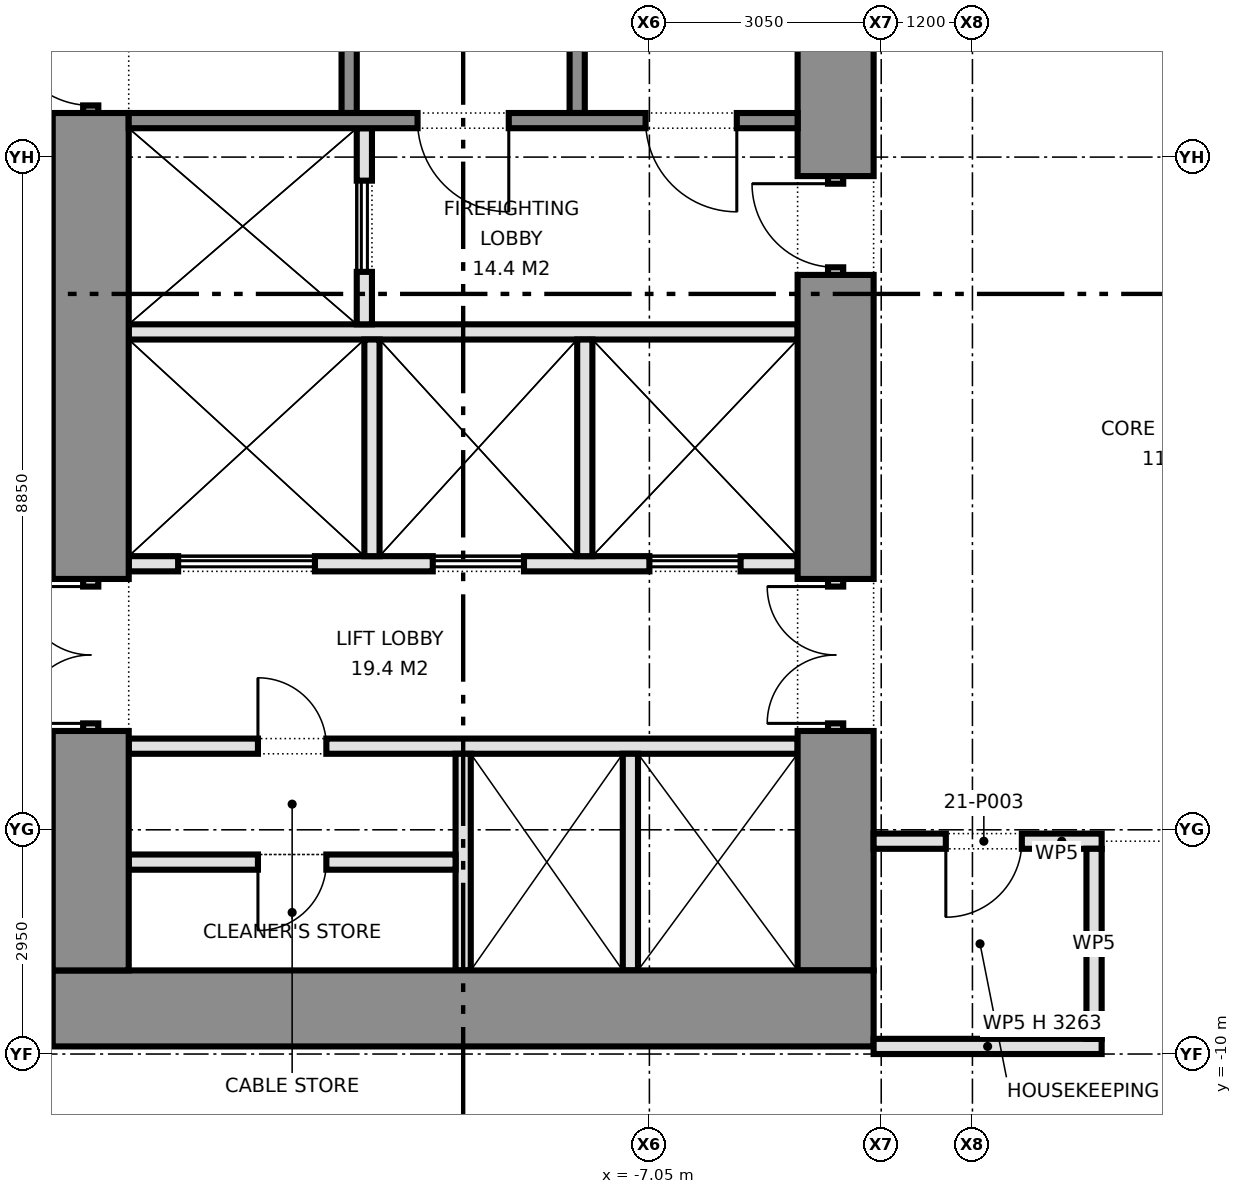
"""IFC4 building model, lengths in metres.
Left out: names, types, materials, properties, quantities, classifications, styles, units other than length and angle.
Written with IfcOpenShell. Run it as: python <this file> out.ifc"""

import sys

from ifc_helpers import new_model, si_unit, direction, frame, frame_2d, origin, place, context, subcontext, project, spatial, rectangle, extrude, element, fill, save


model = new_model("IFC4")
c1 = context("Model", 3, precision=1e-05, world=origin(), true_north=direction((0.0, 1.0)))
c2 = subcontext(c1, "Body", "Model", "MODEL_VIEW")
j1 = project(units=[si_unit("LENGTHUNIT", "METRE"), si_unit("PLANEANGLEUNIT", "RADIAN")], contexts=[c1])
p1 = place(None, origin())
s1 = spatial("IfcSite", under=j1, at=p1, CompositionType="ELEMENT")
p2 = place(p1, origin())
s2 = spatial("IfcBuilding", under=s1, at=p2, CompositionType="ELEMENT")
p3 = place(p2, frame((0.0, 0.0, 95.2)))
s3 = spatial("IfcBuildingStorey", under=s2, at=p3, CompositionType="ELEMENT", Elevation=95.2)
p4 = place(p3, frame((-14.9, -9.4, 0.0), z_axis=(0.0, 0.0, 1.0), x_axis=(1.0, 0.0, 0.0)))
e1 = element("IfcWall", 1, at=p4, inside=s3, PredefinedType="SHEAR", context=c2, shape_type="SweptSolid", body=[
    extrude(rectangle(XDim=10.8, YDim=1.0, at=frame_2d((5.4, 0.0))), origin(), (0.0, 0.0, 1.0), 4.2),
])
p5 = place(p3, frame((-14.4, -8.9, 0.0), z_axis=(0.0, 0.0, 1.0), x_axis=(0.0, 1.0, 0.0)))
e2 = element("IfcWall", 2, at=p5, inside=s3, PredefinedType="SHEAR", context=c2, shape_type="SweptSolid", body=[
    extrude(rectangle(XDim=3.15, YDim=1.0, at=frame_2d((1.575, 0.0))), origin(), (0.0, 0.0, 1.0), 4.2),
])
p6 = place(p3, frame((-14.4, -5.75, 0.0), z_axis=(0.0, 0.0, 1.0), x_axis=(0.0, 1.0, 0.0)))
e3 = element("IfcWall", 3, at=p6, inside=s3, PredefinedType="PARTITIONING", context=c2, shape_type="SweptSolid", body=[
    extrude(rectangle(XDim=2.0, YDim=0.2, at=frame_2d((1.0, 0.0))), origin(), (0.0, 0.0, 1.0), 2.4),
])
p7 = place(p6, frame((0.1, 0.0, 0.0)))
e4 = element("IfcOpeningElement", 4, at=p7, cuts=e3, PredefinedType="OPENING", context=c2, shape_type="SweptSolid", body=[
    extrude(rectangle(XDim=1.8, YDim=2.1, at=frame_2d((0.9, 1.05))), frame((0.0, 0.11, 0.0), z_axis=(0.0, -1.0, 0.0), x_axis=(1.0, 0.0, 0.0)), (0.0, 0.0, 1.0), 0.22),
])
p8 = place(p3, frame((-14.4, -3.75, 0.0), z_axis=(0.0, 0.0, 1.0), x_axis=(0.0, 1.0, 0.0)))
e5 = element("IfcWall", 5, at=p8, inside=s3, PredefinedType="SHEAR", context=c2, shape_type="SweptSolid", body=[
    extrude(rectangle(XDim=6.13, YDim=1.0, at=frame_2d((3.065, 0.0))), origin(), (0.0, 0.0, 1.0), 4.2),
])
p9 = place(p3, frame((-14.4, 2.38, 0.0), z_axis=(0.0, 0.0, 1.0), x_axis=(0.0, 1.0, 0.0)))
e6 = element("IfcWall", 6, at=p9, inside=s3, PredefinedType="SHEAR", context=c2, shape_type="SweptSolid", body=[
    extrude(rectangle(XDim=1.3, YDim=0.2, at=frame_2d((0.65, 0.0))), origin(), (0.0, 0.0, 1.0), 2.4),
])
p10 = place(p9, frame((0.1, 0.0, 0.0)))
e7 = element("IfcOpeningElement", 7, at=p10, cuts=e6, PredefinedType="OPENING", context=c2, shape_type="SweptSolid", body=[
    extrude(rectangle(XDim=1.1, YDim=2.1, at=frame_2d((0.55, 1.05))), frame((0.0, 0.11, 0.0), z_axis=(0.0, -1.0, 0.0), x_axis=(1.0, 0.0, 0.0)), (0.0, 0.0, 1.0), 0.22),
])
p11 = place(p3, frame((-4.6, -8.9, 0.0), z_axis=(0.0, 0.0, 1.0), x_axis=(0.0, 1.0, 0.0)))
e8 = element("IfcWall", 8, at=p11, inside=s3, PredefinedType="SHEAR", context=c2, shape_type="SweptSolid", body=[
    extrude(rectangle(XDim=3.15, YDim=1.0, at=frame_2d((1.575, 0.0))), origin(), (0.0, 0.0, 1.0), 4.2),
])
p12 = place(p3, frame((-4.6, -5.75, 0.0), z_axis=(0.0, 0.0, 1.0), x_axis=(0.0, 1.0, 0.0)))
e9 = element("IfcWall", 9, at=p12, inside=s3, PredefinedType="PARTITIONING", context=c2, shape_type="SweptSolid", body=[
    extrude(rectangle(XDim=2.0, YDim=0.2, at=frame_2d((1.0, 0.0))), origin(), (0.0, 0.0, 1.0), 2.4),
])
p13 = place(p12, frame((0.1, 0.0, 0.0)))
e10 = element("IfcOpeningElement", 10, at=p13, cuts=e9, PredefinedType="OPENING", context=c2, shape_type="SweptSolid", body=[
    extrude(rectangle(XDim=1.8, YDim=2.1, at=frame_2d((0.9, 1.05))), frame((0.0, 0.11, 0.0), z_axis=(0.0, -1.0, 0.0), x_axis=(1.0, 0.0, 0.0)), (0.0, 0.0, 1.0), 0.22),
])
p14 = place(p3, frame((-4.6, -3.75, 0.0), z_axis=(0.0, 0.0, 1.0), x_axis=(0.0, 1.0, 0.0)))
e11 = element("IfcWall", 11, at=p14, inside=s3, PredefinedType="SHEAR", context=c2, shape_type="SweptSolid", body=[
    extrude(rectangle(XDim=4.0, YDim=1.0, at=frame_2d((2.0, 0.0))), origin(), (0.0, 0.0, 1.0), 4.2),
])
p15 = place(p3, frame((-4.6, 0.25, 0.0), z_axis=(0.0, 0.0, 1.0), x_axis=(0.0, 1.0, 0.0)))
e12 = element("IfcWall", 12, at=p15, inside=s3, PredefinedType="PARTITIONING", context=c2, shape_type="SweptSolid", body=[
    extrude(rectangle(XDim=1.3, YDim=0.2, at=frame_2d((0.65, 0.0))), origin(), (0.0, 0.0, 1.0), 2.4),
])
p16 = place(p15, frame((0.1, 0.0, 0.0)))
e13 = element("IfcOpeningElement", 13, at=p16, cuts=e12, PredefinedType="OPENING", context=c2, shape_type="SweptSolid", body=[
    extrude(rectangle(XDim=1.1, YDim=2.1, at=frame_2d((0.55, 1.05))), frame((0.0, 0.11, 0.0), z_axis=(0.0, -1.0, 0.0), x_axis=(1.0, 0.0, 0.0)), (0.0, 0.0, 1.0), 0.22),
])
p17 = place(p3, frame((-4.6, 1.55, 0.0), z_axis=(0.0, 0.0, 1.0), x_axis=(0.0, 1.0, 0.0)))
e14 = element("IfcWall", 14, at=p17, inside=s3, PredefinedType="SHEAR", context=c2, shape_type="SweptSolid", body=[
    extrude(rectangle(XDim=7.35, YDim=1.0, at=frame_2d((3.675, 0.0))), origin(), (0.0, 0.0, 1.0), 4.2),
])
p18 = place(p3, frame((-13.9, -5.95, 0.0), z_axis=(0.0, 0.0, 1.0), x_axis=(1.0, 0.0, 0.0)))
e15 = element("IfcWall", 15, at=p18, inside=s3, PredefinedType="PARTITIONING", context=c2, shape_type="SweptSolid", body=[
    extrude(rectangle(XDim=8.8, YDim=0.2, at=frame_2d((4.4, 0.0))), origin(), (0.0, 0.0, 1.0), 4.2),
])
p19 = place(p18, frame((1.7, 0.0, 0.0)))
e16 = element("IfcOpeningElement", 16, at=p19, cuts=e15, PredefinedType="OPENING", context=c2, shape_type="SweptSolid", body=[
    extrude(rectangle(XDim=0.9, YDim=2.1, at=frame_2d((0.45, 1.05))), frame((0.0, 0.11, 0.0), z_axis=(0.0, -1.0, 0.0), x_axis=(1.0, 0.0, 0.0)), (0.0, 0.0, 1.0), 0.22),
])
p20 = place(p3, frame((-13.9, -3.55, 0.0), z_axis=(0.0, 0.0, 1.0), x_axis=(1.0, 0.0, 0.0)))
e17 = element("IfcWall", 17, at=p20, inside=s3, PredefinedType="PARTITIONING", context=c2, shape_type="SweptSolid", body=[
    extrude(rectangle(XDim=8.8, YDim=0.2, at=frame_2d((4.4, 0.0))), origin(), (0.0, 0.0, 1.0), 4.2),
])
p21 = place(p20, frame((0.65, 0.0, 0.0)))
e18 = element("IfcOpeningElement", 18, at=p21, cuts=e17, PredefinedType="OPENING", context=c2, shape_type="SweptSolid", body=[
    extrude(rectangle(XDim=1.8, YDim=2.1, at=frame_2d((0.9, 1.05))), frame((0.0, 0.11, 0.0), z_axis=(0.0, -1.0, 0.0), x_axis=(1.0, 0.0, 0.0)), (0.0, 0.0, 1.0), 0.22),
])
p22 = place(p20, frame((4.0, 0.0, 0.0)))
e19 = element("IfcOpeningElement", 19, at=p22, cuts=e17, PredefinedType="OPENING", context=c2, shape_type="SweptSolid", body=[
    extrude(rectangle(XDim=1.2, YDim=2.1, at=frame_2d((0.6, 1.05))), frame((0.0, 0.11, 0.0), z_axis=(0.0, -1.0, 0.0), x_axis=(1.0, 0.0, 0.0)), (0.0, 0.0, 1.0), 0.22),
])
p23 = place(p20, frame((6.85, 0.0, 0.0)))
e20 = element("IfcOpeningElement", 20, at=p23, cuts=e17, PredefinedType="OPENING", context=c2, shape_type="SweptSolid", body=[
    extrude(rectangle(XDim=1.2, YDim=2.1, at=frame_2d((0.6, 1.05))), frame((0.0, 0.11, 0.0), z_axis=(0.0, -1.0, 0.0), x_axis=(1.0, 0.0, 0.0)), (0.0, 0.0, 1.0), 0.22),
])
p24 = place(p3, frame((-13.9, -0.5, 0.0), z_axis=(0.0, 0.0, 1.0), x_axis=(1.0, 0.0, 0.0)))
e21 = element("IfcWall", 21, at=p24, inside=s3, PredefinedType="PARTITIONING", context=c2, shape_type="SweptSolid", body=[
    extrude(rectangle(XDim=8.8, YDim=0.2, at=frame_2d((4.4, 0.0))), origin(), (0.0, 0.0, 1.0), 4.2),
])
p25 = place(p3, frame((-10.8, -0.4, 0.0), z_axis=(0.0, 0.0, 1.0), x_axis=(0.0, 1.0, 0.0)))
e22 = element("IfcWall", 22, at=p25, inside=s3, PredefinedType="PARTITIONING", context=c2, shape_type="SweptSolid", body=[
    extrude(rectangle(XDim=2.58, YDim=0.2, at=frame_2d((1.29, 0.0))), origin(), (0.0, 0.0, 1.0), 4.2),
])
p26 = place(p25, frame((0.69, 0.0, 0.0)))
e23 = element("IfcOpeningElement", 23, at=p26, cuts=e22, PredefinedType="OPENING", context=c2, shape_type="SweptSolid", body=[
    extrude(rectangle(XDim=1.2, YDim=2.1, at=frame_2d((0.6, 1.05))), frame((0.0, 0.11, 0.0), z_axis=(0.0, -1.0, 0.0), x_axis=(1.0, 0.0, 0.0)), (0.0, 0.0, 1.0), 0.22),
])
p27 = place(p3, frame((-13.9, 2.28, 0.0), z_axis=(0.0, 0.0, 1.0), x_axis=(1.0, 0.0, 0.0)))
e24 = element("IfcWall", 24, at=p27, inside=s3, PredefinedType="SHEAR", context=c2, shape_type="SweptSolid", body=[
    extrude(rectangle(XDim=8.8, YDim=0.2, at=frame_2d((4.4, 0.0))), origin(), (0.0, 0.0, 1.0), 4.2),
])
p28 = place(p27, frame((3.8, 0.0, 0.0)))
e25 = element("IfcOpeningElement", 25, at=p28, cuts=e24, PredefinedType="OPENING", context=c2, shape_type="SweptSolid", body=[
    extrude(rectangle(XDim=1.2, YDim=2.1, at=frame_2d((0.6, 1.05))), frame((0.0, 0.11, 0.0), z_axis=(0.0, -1.0, 0.0), x_axis=(1.0, 0.0, 0.0)), (0.0, 0.0, 1.0), 0.22),
])
p29 = place(p27, frame((6.8, 0.0, 0.0)))
e26 = element("IfcOpeningElement", 26, at=p29, cuts=e24, PredefinedType="OPENING", context=c2, shape_type="SweptSolid", body=[
    extrude(rectangle(XDim=1.2, YDim=2.1, at=frame_2d((0.6, 1.05))), frame((0.0, 0.11, 0.0), z_axis=(0.0, -1.0, 0.0), x_axis=(1.0, 0.0, 0.0)), (0.0, 0.0, 1.0), 0.22),
])
for number, where, z_axis, x_axis in (
    (27, (-11.0, 2.38, 0.0), (0.0, 0.0, 1.0), (0.0, 1.0, 0.0)),
    (28, (-8.0, 2.38, 0.0), (0.0, 0.0, 1.0), (0.0, 1.0, 0.0)),
):
    element("IfcWall", number, at=place(p3, frame(where, z_axis=z_axis, x_axis=x_axis)), inside=s3, PredefinedType="SHEAR", context=c2, shape_type="SweptSolid", body=[
        extrude(rectangle(XDim=6.52, YDim=0.2, at=frame_2d((3.26, 0.0))), origin(), (0.0, 0.0, 1.0), 4.2),
    ])
for number, where, z_axis, x_axis in (
    (29, (-9.5, -8.9, 0.0), (0.0, 0.0, 1.0), (0.0, 1.0, 0.0)),
    (30, (-7.3, -8.9, 0.0), (0.0, 0.0, 1.0), (0.0, 1.0, 0.0)),
):
    element("IfcWall", number, at=place(p3, frame(where, z_axis=z_axis, x_axis=x_axis)), inside=s3, PredefinedType="PARTITIONING", context=c2, shape_type="SweptSolid", body=[
        extrude(rectangle(XDim=2.85, YDim=0.2, at=frame_2d((1.425, 0.0))), origin(), (0.0, 0.0, 1.0), 4.2),
    ])
p30 = place(p3, frame((-13.9, -7.475, 0.0), z_axis=(0.0, 0.0, 1.0), x_axis=(1.0, 0.0, 0.0)))
e31 = element("IfcWall", 31, at=p30, inside=s3, PredefinedType="PARTITIONING", context=c2, shape_type="SweptSolid", body=[
    extrude(rectangle(XDim=4.3, YDim=0.2, at=frame_2d((2.15, 0.0))), origin(), (0.0, 0.0, 1.0), 4.2),
])
p31 = place(p30, frame((1.7, 0.0, 0.0)))
e32 = element("IfcOpeningElement", 32, at=p31, cuts=e31, PredefinedType="OPENING", context=c2, shape_type="SweptSolid", body=[
    extrude(rectangle(XDim=0.9, YDim=2.1, at=frame_2d((0.45, 1.05))), frame((0.0, 0.11, 0.0), z_axis=(0.0, -1.0, 0.0), x_axis=(1.0, 0.0, 0.0)), (0.0, 0.0, 1.0), 0.22),
])
for number, where, z_axis, x_axis in (
    (33, (-10.7, -3.45, 0.0), (0.0, 0.0, 1.0), (0.0, 1.0, 0.0)),
    (34, (-7.9, -3.45, 0.0), (0.0, 0.0, 1.0), (0.0, 1.0, 0.0)),
):
    element("IfcWall", number, at=place(p3, frame(where, z_axis=z_axis, x_axis=x_axis)), inside=s3, PredefinedType="PARTITIONING", context=c2, shape_type="SweptSolid", body=[
        extrude(rectangle(XDim=2.85, YDim=0.2, at=frame_2d((1.425, 0.0))), origin(), (0.0, 0.0, 1.0), 4.2),
    ])
p32 = place(p3, frame((-4.1, -9.9, 0.0), z_axis=(0.0, 0.0, 1.0), x_axis=(1.0, 0.0, 0.0)))
e35 = element("IfcWall", 35, at=p32, inside=s3, PredefinedType="PARTITIONING", context=c2, shape_type="SweptSolid", body=[
    extrude(rectangle(XDim=3.0, YDim=0.2, at=frame_2d((1.5, 0.0))), origin(), (0.0, 0.0, 1.0), 3.263),
])
p33 = place(p3, frame((-4.1, -7.2, 0.0), z_axis=(0.0, 0.0, 1.0), x_axis=(1.0, 0.0, 0.0)))
e36 = element("IfcWall", 36, at=p33, inside=s3, PredefinedType="PARTITIONING", context=c2, shape_type="SweptSolid", body=[
    extrude(rectangle(XDim=3.0, YDim=0.2, at=frame_2d((1.5, 0.0))), origin(), (0.0, 0.0, 1.0), 4.2),
])
p34 = place(p33, frame((0.95, 0.0, 0.0)))
e37 = element("IfcOpeningElement", 37, at=p34, cuts=e36, PredefinedType="OPENING", context=c2, shape_type="SweptSolid", body=[
    extrude(rectangle(XDim=1.0, YDim=2.1, at=frame_2d((0.5, 1.05))), frame((0.0, 0.11, 0.0), z_axis=(0.0, -1.0, 0.0), x_axis=(1.0, 0.0, 0.0)), (0.0, 0.0, 1.0), 0.22),
])
p35 = place(p3, frame((-1.2, -9.8, 0.0), z_axis=(0.0, 0.0, 1.0), x_axis=(0.0, 1.0, 0.0)))
e38 = element("IfcWall", 38, at=p35, inside=s3, PredefinedType="PARTITIONING", context=c2, shape_type="SweptSolid", body=[
    extrude(rectangle(XDim=2.5, YDim=0.2, at=frame_2d((1.25, 0.0))), origin(), (0.0, 0.0, 1.0), 4.2),
])
p36 = place(p7, origin())
e39 = element("IfcDoor", 39, at=p36, inside=s3, OperationType="DOUBLE_DOOR_SINGLE_SWING", PredefinedType="DOOR", context=c2, shape_type="SweptSolid", body=[
    extrude(rectangle(XDim=1.8, YDim=2.1, at=frame_2d((0.9, 1.05))), frame((0.0, 0.025, 0.0), z_axis=(0.0, -1.0, 0.0), x_axis=(1.0, 0.0, 0.0)), (0.0, 0.0, 1.0), 0.05),
])
fill(e4, e39)
p37 = place(p10, origin())
e40 = element("IfcDoor", 40, at=p37, inside=s3, OperationType="SINGLE_SWING_RIGHT", PredefinedType="DOOR", context=c2, shape_type="SweptSolid", body=[
    extrude(rectangle(XDim=1.1, YDim=2.1, at=frame_2d((0.55, 1.05))), frame((0.0, 0.025, 0.0), z_axis=(0.0, -1.0, 0.0), x_axis=(1.0, 0.0, 0.0)), (0.0, 0.0, 1.0), 0.05),
])
fill(e7, e40)
p38 = place(p13, origin())
e41 = element("IfcDoor", 41, at=p38, inside=s3, OperationType="DOUBLE_DOOR_SINGLE_SWING", PredefinedType="DOOR", context=c2, shape_type="SweptSolid", body=[
    extrude(rectangle(XDim=1.8, YDim=2.1, at=frame_2d((0.9, 1.05))), frame((0.0, 0.025, 0.0), z_axis=(0.0, -1.0, 0.0), x_axis=(1.0, 0.0, 0.0)), (0.0, 0.0, 1.0), 0.05),
])
fill(e10, e41)
p39 = place(p16, origin())
e42 = element("IfcDoor", 42, at=p39, inside=s3, OperationType="SINGLE_SWING_RIGHT", PredefinedType="DOOR", context=c2, shape_type="SweptSolid", body=[
    extrude(rectangle(XDim=1.1, YDim=2.1, at=frame_2d((0.55, 1.05))), frame((0.0, 0.025, 0.0), z_axis=(0.0, -1.0, 0.0), x_axis=(1.0, 0.0, 0.0)), (0.0, 0.0, 1.0), 0.05),
])
fill(e13, e42)
p40 = place(p21, origin())
e43 = element("IfcDoor", 43, at=p40, inside=s3, OperationType="DOUBLE_DOOR_SLIDING", PredefinedType="DOOR", context=c2, shape_type="SweptSolid", body=[
    extrude(rectangle(XDim=1.8, YDim=2.1, at=frame_2d((0.9, 1.05))), frame((0.0, 0.025, 0.0), z_axis=(0.0, -1.0, 0.0), x_axis=(1.0, 0.0, 0.0)), (0.0, 0.0, 1.0), 0.05),
])
fill(e18, e43)
p41 = place(p22, origin())
e44 = element("IfcDoor", 44, at=p41, inside=s3, OperationType="DOUBLE_DOOR_SLIDING", PredefinedType="DOOR", context=c2, shape_type="SweptSolid", body=[
    extrude(rectangle(XDim=1.2, YDim=2.1, at=frame_2d((0.6, 1.05))), frame((0.0, 0.025, 0.0), z_axis=(0.0, -1.0, 0.0), x_axis=(1.0, 0.0, 0.0)), (0.0, 0.0, 1.0), 0.05),
])
fill(e19, e44)
p42 = place(p23, origin())
e45 = element("IfcDoor", 45, at=p42, inside=s3, OperationType="DOUBLE_DOOR_SLIDING", PredefinedType="DOOR", context=c2, shape_type="SweptSolid", body=[
    extrude(rectangle(XDim=1.2, YDim=2.1, at=frame_2d((0.6, 1.05))), frame((0.0, 0.025, 0.0), z_axis=(0.0, -1.0, 0.0), x_axis=(1.0, 0.0, 0.0)), (0.0, 0.0, 1.0), 0.05),
])
fill(e20, e45)
p43 = place(p26, origin())
e46 = element("IfcDoor", 46, at=p43, inside=s3, OperationType="DOUBLE_DOOR_SLIDING", PredefinedType="DOOR", context=c2, shape_type="SweptSolid", body=[
    extrude(rectangle(XDim=1.2, YDim=2.1, at=frame_2d((0.6, 1.05))), frame((0.0, 0.025, 0.0), z_axis=(0.0, -1.0, 0.0), x_axis=(1.0, 0.0, 0.0)), (0.0, 0.0, 1.0), 0.05),
])
fill(e23, e46)
p44 = place(p19, origin())
e47 = element("IfcDoor", 47, at=p44, inside=s3, OperationType="SINGLE_SWING_LEFT", PredefinedType="DOOR", context=c2, shape_type="SweptSolid", body=[
    extrude(rectangle(XDim=0.9, YDim=2.1, at=frame_2d((0.45, 1.05))), frame((0.0, 0.025, 0.0), z_axis=(0.0, -1.0, 0.0), x_axis=(1.0, 0.0, 0.0)), (0.0, 0.0, 1.0), 0.05),
])
fill(e16, e47)
p45 = place(p31, frame((0.9, 0.0, 0.0), z_axis=(0.0, 0.0, 1.0), x_axis=(-1.0, 0.0, 0.0)))
e48 = element("IfcDoor", 48, at=p45, inside=s3, OperationType="SINGLE_SWING_RIGHT", PredefinedType="DOOR", context=c2, shape_type="SweptSolid", body=[
    extrude(rectangle(XDim=0.9, YDim=2.1, at=frame_2d((0.45, 1.05))), frame((0.0, 0.025, 0.0), z_axis=(0.0, -1.0, 0.0), x_axis=(1.0, 0.0, 0.0)), (0.0, 0.0, 1.0), 0.05),
])
fill(e32, e48)
p46 = place(p28, frame((1.2, 0.0, 0.0), z_axis=(0.0, 0.0, 1.0), x_axis=(-1.0, 0.0, 0.0)))
e49 = element("IfcDoor", 49, at=p46, inside=s3, OperationType="SINGLE_SWING_LEFT", PredefinedType="DOOR", context=c2, shape_type="SweptSolid", body=[
    extrude(rectangle(XDim=1.2, YDim=2.1, at=frame_2d((0.6, 1.05))), frame((0.0, 0.025, 0.0), z_axis=(0.0, -1.0, 0.0), x_axis=(1.0, 0.0, 0.0)), (0.0, 0.0, 1.0), 0.05),
])
fill(e25, e49)
p47 = place(p29, frame((1.2, 0.0, 0.0), z_axis=(0.0, 0.0, 1.0), x_axis=(-1.0, 0.0, 0.0)))
e50 = element("IfcDoor", 50, at=p47, inside=s3, OperationType="SINGLE_SWING_LEFT", PredefinedType="DOOR", context=c2, shape_type="SweptSolid", body=[
    extrude(rectangle(XDim=1.2, YDim=2.1, at=frame_2d((0.6, 1.05))), frame((0.0, 0.025, 0.0), z_axis=(0.0, -1.0, 0.0), x_axis=(1.0, 0.0, 0.0)), (0.0, 0.0, 1.0), 0.05),
])
fill(e26, e50)
p48 = place(p34, frame((1.0, 0.0, 0.0), z_axis=(0.0, 0.0, 1.0), x_axis=(-1.0, 0.0, 0.0)))
e51 = element("IfcDoor", 51, at=p48, inside=s3, OperationType="SINGLE_SWING_RIGHT", PredefinedType="DOOR", context=c2, shape_type="SweptSolid", body=[
    extrude(rectangle(XDim=1.0, YDim=2.1, at=frame_2d((0.5, 1.05))), frame((0.0, 0.025, 0.0), z_axis=(0.0, -1.0, 0.0), x_axis=(1.0, 0.0, 0.0)), (0.0, 0.0, 1.0), 0.05),
])
fill(e37, e51)
save(model, sys.argv[1])
